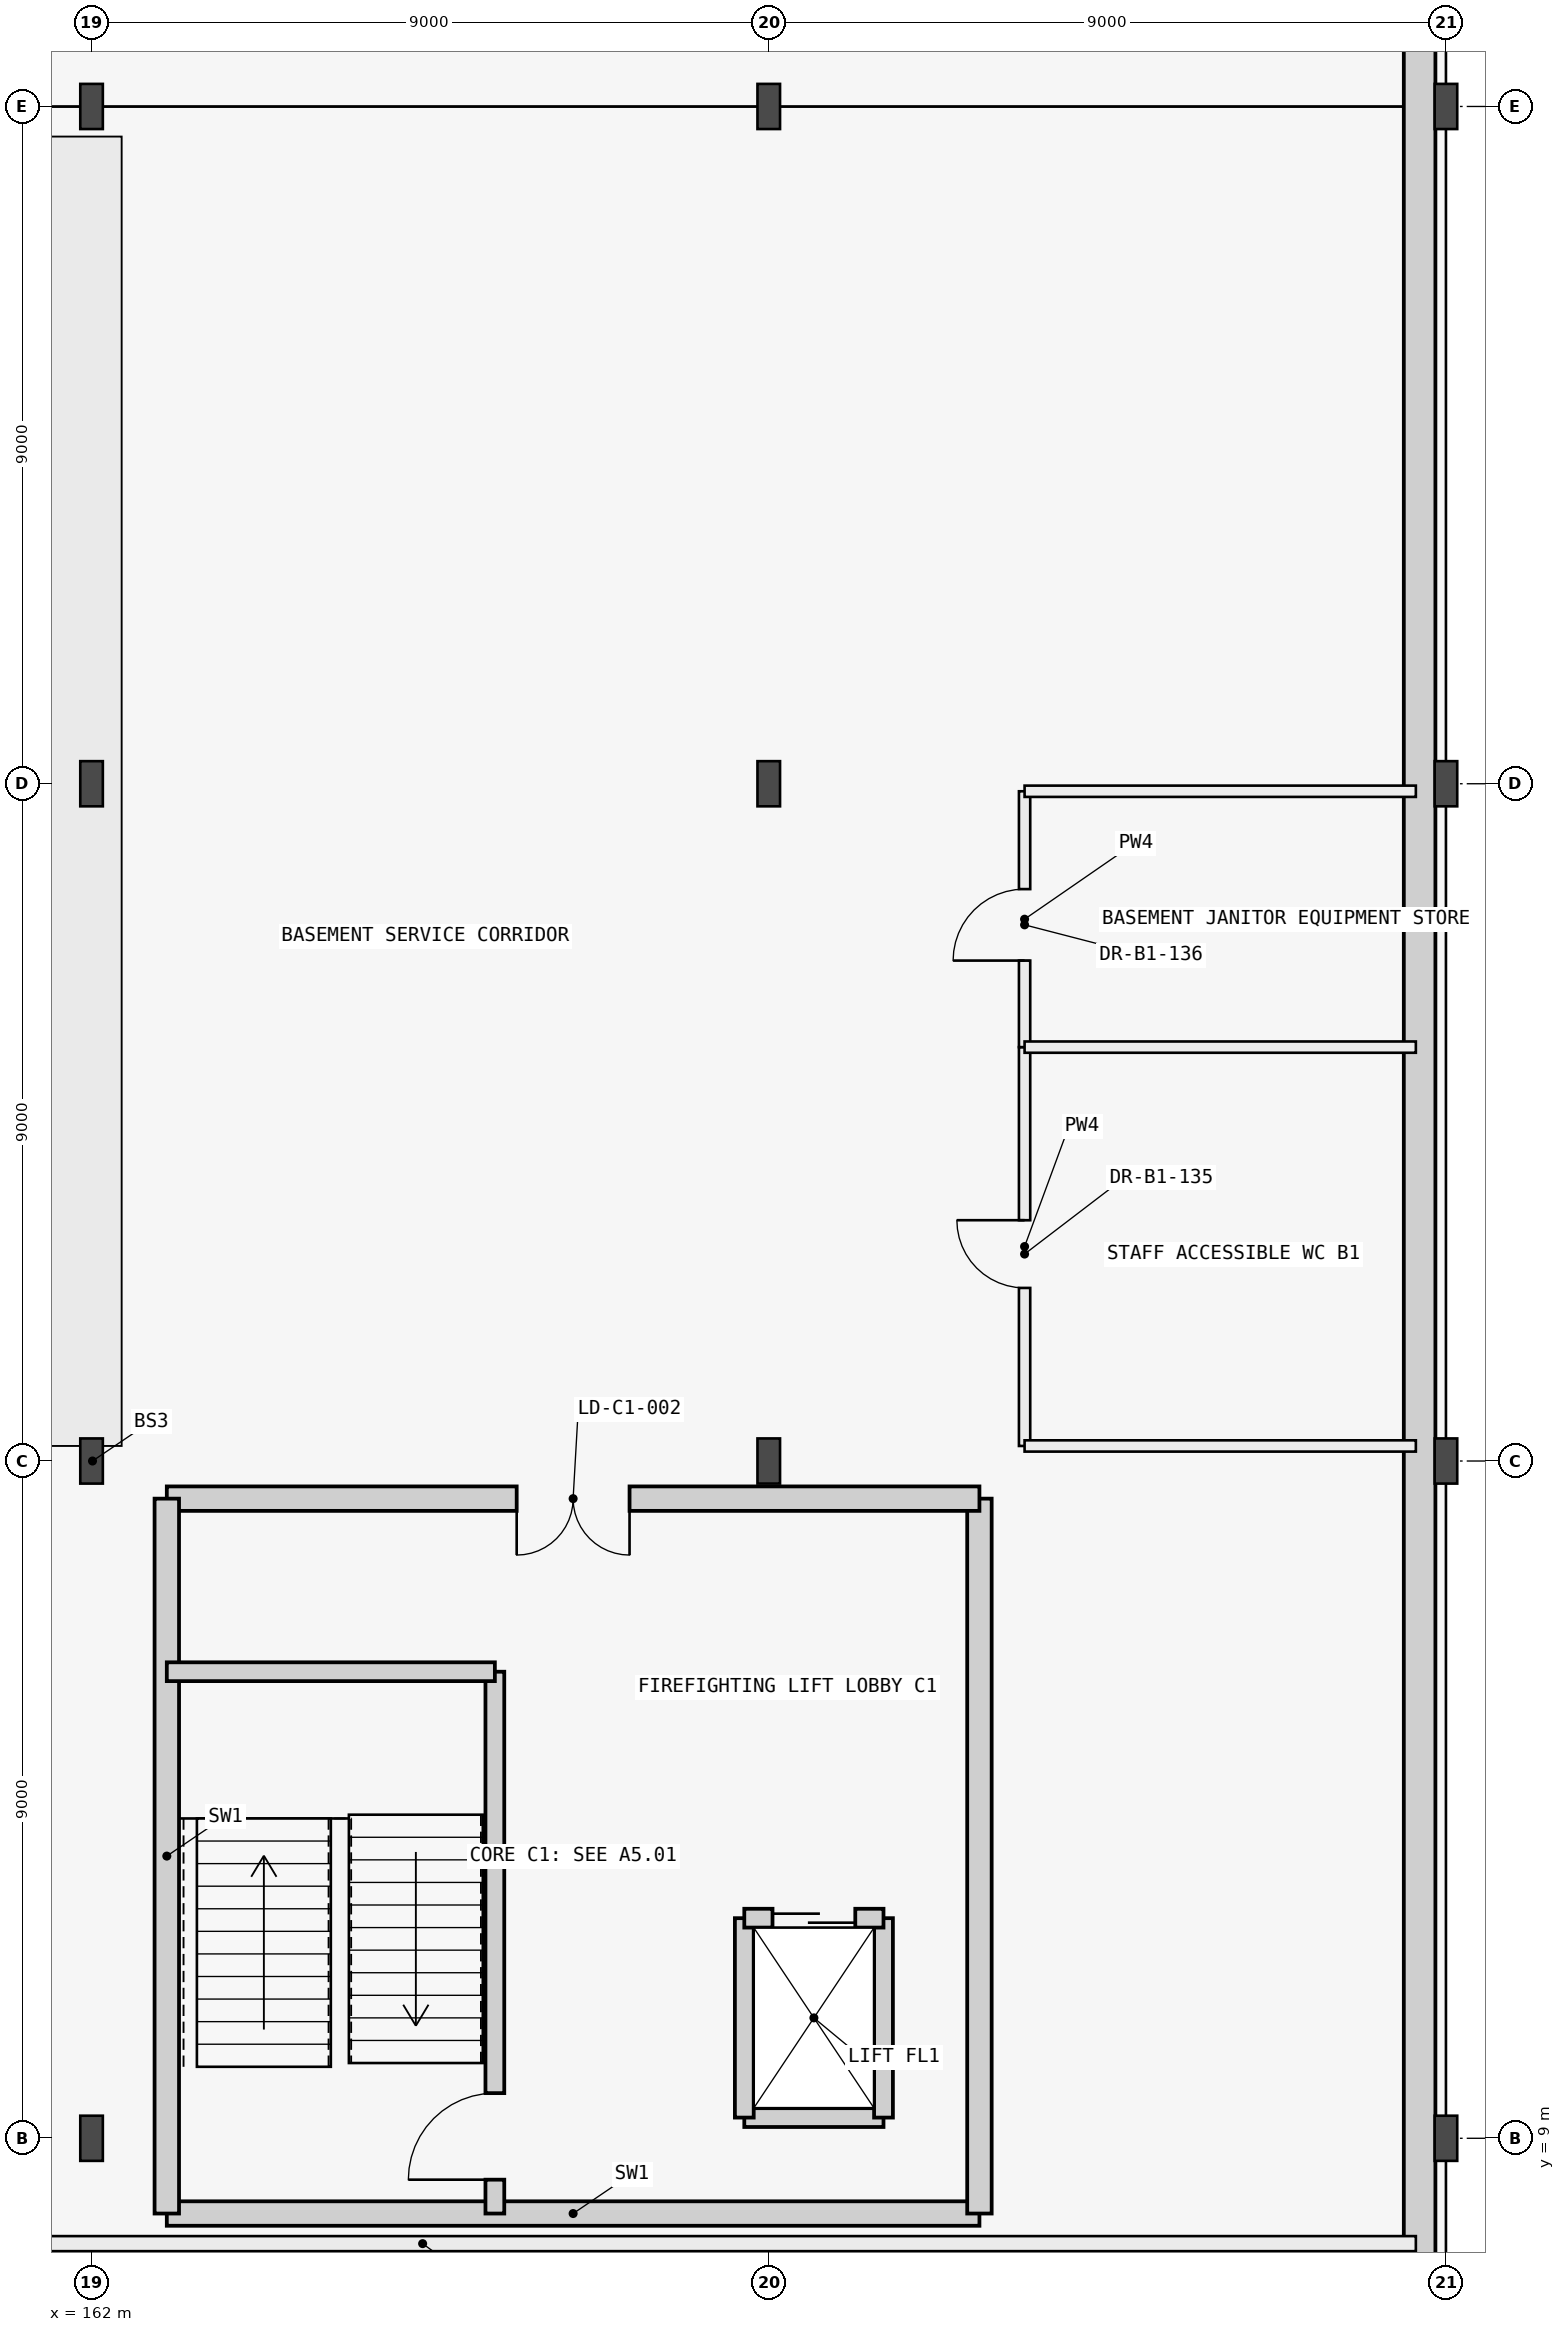
"""IFC4 building model, lengths in metres.
Left out: names, types, materials, properties, quantities, classifications, styles, units other than length and angle.
Written with IfcOpenShell. Run it as: python <this file> out.ifc"""

import sys

from ifc_helpers import new_model, si_unit, direction, frame, frame_2d, origin, origin_2d, place, context, subcontext, project, spatial, rectangle, i_section, extrude, element, fill, save


model = new_model("IFC4")
c1 = context("Model", 3, precision=1e-05, world=origin(), true_north=direction((0.0, 1.0)))
c2 = subcontext(c1, "Body", "Model", "MODEL_VIEW")
j1 = project(units=[si_unit("LENGTHUNIT", "METRE"), si_unit("PLANEANGLEUNIT", "RADIAN")], contexts=[c1])
p1 = place(None, origin())
s1 = spatial("IfcSite", under=j1, at=p1, CompositionType="ELEMENT")
p2 = place(p1, origin())
s2 = spatial("IfcBuilding", under=s1, at=p2, CompositionType="ELEMENT")
p3 = place(p2, frame((0.0, 0.0, -4.2)))
s3 = spatial("IfcBuildingStorey", under=s2, at=p3, CompositionType="ELEMENT", Elevation=-4.2)
for number, where, z_axis, x_axis in (
    (1, (162.0, 9.0, 0.0), (0.0, 0.0, 1.0), (1.0, 0.0, 0.0)),
    (2, (180.0, 9.0, 0.0), (0.0, 0.0, 1.0), (1.0, 0.0, 0.0)),
    (3, (162.0, 18.0, 0.0), (0.0, 0.0, 1.0), (1.0, 0.0, 0.0)),
    (4, (171.0, 18.0, 0.0), (0.0, 0.0, 1.0), (1.0, 0.0, 0.0)),
    (5, (180.0, 18.0, 0.0), (0.0, 0.0, 1.0), (1.0, 0.0, 0.0)),
    (6, (162.0, 27.0, 0.0), (0.0, 0.0, 1.0), (1.0, 0.0, 0.0)),
    (7, (171.0, 27.0, 0.0), (0.0, 0.0, 1.0), (1.0, 0.0, 0.0)),
    (8, (180.0, 27.0, 0.0), (0.0, 0.0, 1.0), (1.0, 0.0, 0.0)),
    (9, (162.0, 36.0, 0.0), (0.0, 0.0, 1.0), (1.0, 0.0, 0.0)),
    (10, (171.0, 36.0, 0.0), (0.0, 0.0, 1.0), (1.0, 0.0, 0.0)),
    (11, (180.0, 36.0, 0.0), (0.0, 0.0, 1.0), (1.0, 0.0, 0.0)),
):
    element("IfcColumn", number, at=place(p3, frame(where, z_axis=z_axis, x_axis=x_axis)), inside=s3, PredefinedType="COLUMN", context=c2, shape_type="SweptSolid", body=[
        extrude(i_section(OverallWidth=0.3, OverallDepth=0.6, WebThickness=0.015, FlangeThickness=0.03, FilletRadius=0.027, at=origin_2d()), origin(), (0.0, 0.0, 1.0), 4.2),
    ])
p4 = place(p3, frame((179.65, 0.56, 0.0), z_axis=(0.0, 0.0, 1.0), x_axis=(0.0, 1.0, 0.0)))
e12 = element("IfcWall", 12, at=p4, inside=s3, PredefinedType="USERDEFINED", context=c2, shape_type="SweptSolid", body=[
    extrude(rectangle(XDim=62.28, YDim=0.42, at=frame_2d((31.14, 0.0))), origin(), (0.0, 0.0, 1.0), 3.6),
])
p5 = place(p3, frame((163.0, 8.0, 0.0), z_axis=(0.0, 0.0, 1.0), x_axis=(1.0, 0.0, 0.0)))
e13 = element("IfcWall", 13, at=p5, inside=s3, PredefinedType="SHEAR", context=c2, shape_type="SweptSolid", body=[
    extrude(rectangle(XDim=10.8, YDim=0.325, at=frame_2d((5.4, 0.0))), origin(), (0.0, 0.0, 1.0), 3.94),
])
p6 = place(p3, frame((173.8, 8.0, 0.0), z_axis=(0.0, 0.0, 1.0), x_axis=(0.0, 1.0, 0.0)))
e14 = element("IfcWall", 14, at=p6, inside=s3, PredefinedType="SHEAR", context=c2, shape_type="SweptSolid", body=[
    extrude(rectangle(XDim=9.5, YDim=0.325, at=frame_2d((4.75, 0.0))), origin(), (0.0, 0.0, 1.0), 3.94),
])
p7 = place(p3, frame((173.8, 17.5, 0.0), z_axis=(0.0, 0.0, 1.0), x_axis=(-1.0, 0.0, 0.0)))
e15 = element("IfcWall", 15, at=p7, inside=s3, PredefinedType="SHEAR", context=c2, shape_type="SweptSolid", body=[
    extrude(rectangle(XDim=10.8, YDim=0.325, at=frame_2d((5.4, 0.0))), origin(), (0.0, 0.0, 1.0), 3.94),
])
p8 = place(p7, frame((4.65, 0.0, 0.0)))
e16 = element("IfcOpeningElement", 16, at=p8, cuts=e15, PredefinedType="OPENING", context=c2, shape_type="SweptSolid", body=[
    extrude(rectangle(XDim=1.5, YDim=2.2, at=frame_2d((0.75, 1.1))), frame((0.0, 0.172, 0.0), z_axis=(0.0, -1.0, 0.0), x_axis=(1.0, 0.0, 0.0)), (0.0, 0.0, 1.0), 0.345),
])
p9 = place(p3, frame((163.0, 17.5, 0.0), z_axis=(0.0, 0.0, 1.0), x_axis=(0.0, -1.0, 0.0)))
e17 = element("IfcWall", 17, at=p9, inside=s3, PredefinedType="SHEAR", context=c2, shape_type="SweptSolid", body=[
    extrude(rectangle(XDim=9.5, YDim=0.325, at=frame_2d((4.75, 0.0))), origin(), (0.0, 0.0, 1.0), 3.94),
])
p10 = place(p3, frame((167.36, 8.0, 0.0), z_axis=(0.0, 0.0, 1.0), x_axis=(0.0, 1.0, 0.0)))
e18 = element("IfcWall", 18, at=p10, inside=s3, PredefinedType="SHEAR", context=c2, shape_type="SweptSolid", body=[
    extrude(rectangle(XDim=7.2, YDim=0.25, at=frame_2d((3.6, 0.0))), origin(), (0.0, 0.0, 1.0), 3.94),
])
p11 = place(p10, frame((0.45, 0.0, 0.0)))
e19 = element("IfcOpeningElement", 19, at=p11, cuts=e18, PredefinedType="OPENING", context=c2, shape_type="SweptSolid", body=[
    extrude(rectangle(XDim=1.15, YDim=2.15, at=frame_2d((0.575, 1.075))), frame((0.0, 0.135, 0.0), z_axis=(0.0, -1.0, 0.0), x_axis=(1.0, 0.0, 0.0)), (0.0, 0.0, 1.0), 0.27),
])
p12 = place(p3, frame((163.0, 15.2, 0.0), z_axis=(0.0, 0.0, 1.0), x_axis=(1.0, 0.0, 0.0)))
e20 = element("IfcWall", 20, at=p12, inside=s3, PredefinedType="SHEAR", context=c2, shape_type="SweptSolid", body=[
    extrude(rectangle(XDim=4.36, YDim=0.25, at=frame_2d((2.18, 0.0))), origin(), (0.0, 0.0, 1.0), 3.94),
])
p13 = place(p3, frame((170.675, 9.275, 0.0), z_axis=(0.0, 0.0, 1.0), x_axis=(1.0, 0.0, 0.0)))
e21 = element("IfcWall", 21, at=p13, inside=s3, PredefinedType="SHEAR", context=c2, shape_type="SweptSolid", body=[
    extrude(rectangle(XDim=1.85, YDim=0.25, at=frame_2d((0.925, 0.0))), origin(), (0.0, 0.0, 1.0), 3.94),
])
for number, where, z_axis, x_axis in (
    (22, (170.675, 9.275, 0.0), (0.0, 0.0, 1.0), (0.0, 1.0, 0.0)),
    (23, (172.525, 9.275, 0.0), (0.0, 0.0, 1.0), (0.0, 1.0, 0.0)),
):
    element("IfcWall", number, at=place(p3, frame(where, z_axis=z_axis, x_axis=x_axis)), inside=s3, PredefinedType="SHEAR", context=c2, shape_type="SweptSolid", body=[
        extrude(rectangle(XDim=2.65, YDim=0.25, at=frame_2d((1.325, 0.0))), origin(), (0.0, 0.0, 1.0), 3.94),
    ])
p14 = place(p3, frame((170.675, 11.925, 0.0), z_axis=(0.0, 0.0, 1.0), x_axis=(1.0, 0.0, 0.0)))
e24 = element("IfcWall", 24, at=p14, inside=s3, PredefinedType="SHEAR", context=c2, shape_type="SweptSolid", body=[
    extrude(rectangle(XDim=1.85, YDim=0.25, at=frame_2d((0.925, 0.0))), origin(), (0.0, 0.0, 1.0), 3.94),
])
p15 = place(p14, frame((0.375, 0.0, 0.0)))
e25 = element("IfcOpeningElement", 25, at=p15, cuts=e24, PredefinedType="OPENING", context=c2, shape_type="SweptSolid", body=[
    extrude(rectangle(XDim=1.1, YDim=2.15, at=frame_2d((0.55, 1.075))), frame((0.0, 0.135, 0.0), z_axis=(0.0, -1.0, 0.0), x_axis=(1.0, 0.0, 0.0)), (0.0, 0.0, 1.0), 0.27),
])
p16 = place(p3, frame((153.2, 7.6, 0.0), z_axis=(0.0, 0.0, 1.0), x_axis=(1.0, 0.0, 0.0)))
e26 = element("IfcWall", 26, at=p16, inside=s3, PredefinedType="PARTITIONING", context=c2, shape_type="SweptSolid", body=[
    extrude(rectangle(XDim=26.4, YDim=0.2, at=frame_2d((13.2, 0.0))), origin(), (0.0, 0.0, 1.0), 3.94),
])
p17 = place(p16, frame((4.2, 0.0, 0.0)))
e27 = element("IfcOpeningElement", 27, at=p17, cuts=e26, PredefinedType="OPENING", context=c2, shape_type="SweptSolid", body=[
    extrude(rectangle(XDim=1.2, YDim=2.15, at=frame_2d((0.6, 1.075))), frame((0.0, 0.11, 0.0), z_axis=(0.0, -1.0, 0.0), x_axis=(1.0, 0.0, 0.0)), (0.0, 0.0, 1.0), 0.22),
])
p18 = place(p3, frame((174.4, 18.2, 0.0), z_axis=(0.0, 0.0, 1.0), x_axis=(0.0, 1.0, 0.0)))
e28 = element("IfcWall", 28, at=p18, inside=s3, PredefinedType="PARTITIONING", context=c2, shape_type="SweptSolid", body=[
    extrude(rectangle(XDim=5.3, YDim=0.15, at=frame_2d((2.65, 0.0))), origin(), (0.0, 0.0, 1.0), 3.615),
])
p19 = place(p18, frame((2.1, 0.0, 0.0)))
e29 = element("IfcOpeningElement", 29, at=p19, cuts=e28, PredefinedType="OPENING", context=c2, shape_type="SweptSolid", body=[
    extrude(rectangle(XDim=0.9, YDim=2.1, at=frame_2d((0.45, 1.05))), frame((0.0, 0.085, 0.0), z_axis=(0.0, -1.0, 0.0), x_axis=(1.0, 0.0, 0.0)), (0.0, 0.0, 1.0), 0.17),
])
p20 = place(p3, frame((174.4, 23.5, 0.0), z_axis=(0.0, 0.0, 1.0), x_axis=(0.0, 1.0, 0.0)))
e30 = element("IfcWall", 30, at=p20, inside=s3, PredefinedType="PARTITIONING", context=c2, shape_type="SweptSolid", body=[
    extrude(rectangle(XDim=3.4, YDim=0.15, at=frame_2d((1.7, 0.0))), origin(), (0.0, 0.0, 1.0), 3.615),
])
p21 = place(p20, frame((1.15, 0.0, 0.0)))
e31 = element("IfcOpeningElement", 31, at=p21, cuts=e30, PredefinedType="OPENING", context=c2, shape_type="SweptSolid", body=[
    extrude(rectangle(XDim=0.95, YDim=2.1, at=frame_2d((0.475, 1.05))), frame((0.0, 0.085, 0.0), z_axis=(0.0, -1.0, 0.0), x_axis=(1.0, 0.0, 0.0)), (0.0, 0.0, 1.0), 0.17),
])
p22 = place(p3, frame((174.4, 18.2, 0.0), z_axis=(0.0, 0.0, 1.0), x_axis=(1.0, 0.0, 0.0)))
e32 = element("IfcWall", 32, at=p22, inside=s3, PredefinedType="PARTITIONING", context=c2, shape_type="SweptSolid", body=[
    extrude(rectangle(XDim=5.2, YDim=0.15, at=frame_2d((2.6, 0.0))), origin(), (0.0, 0.0, 1.0), 3.415),
])
p23 = place(p3, frame((174.4, 23.5, 0.0), z_axis=(0.0, 0.0, 1.0), x_axis=(1.0, 0.0, 0.0)))
e33 = element("IfcWall", 33, at=p23, inside=s3, PredefinedType="PARTITIONING", context=c2, shape_type="SweptSolid", body=[
    extrude(rectangle(XDim=5.2, YDim=0.15, at=frame_2d((2.6, 0.0))), origin(), (0.0, 0.0, 1.0), 3.94),
])
p24 = place(p3, frame((174.4, 26.9, 0.0), z_axis=(0.0, 0.0, 1.0), x_axis=(1.0, 0.0, 0.0)))
e34 = element("IfcWall", 34, at=p24, inside=s3, PredefinedType="PARTITIONING", context=c2, shape_type="SweptSolid", body=[
    extrude(rectangle(XDim=5.2, YDim=0.15, at=frame_2d((2.6, 0.0))), origin(), (0.0, 0.0, 1.0), 3.415),
])
p25 = place(p11, origin())
e35 = element("IfcDoor", 35, at=p25, inside=s3, OperationType="SINGLE_SWING_LEFT", PredefinedType="DOOR", context=c2, shape_type="SweptSolid", body=[
    extrude(rectangle(XDim=1.15, YDim=2.15, at=frame_2d((0.575, 1.075))), frame((0.0, 0.025, 0.0), z_axis=(0.0, -1.0, 0.0), x_axis=(1.0, 0.0, 0.0)), (0.0, 0.0, 1.0), 0.05),
])
fill(e19, e35)
p26 = place(p8, origin())
e36 = element("IfcDoor", 36, at=p26, inside=s3, OperationType="DOUBLE_DOOR_SINGLE_SWING", PredefinedType="DOOR", context=c2, shape_type="SweptSolid", body=[
    extrude(rectangle(XDim=1.5, YDim=2.2, at=frame_2d((0.75, 1.1))), frame((0.0, 0.025, 0.0), z_axis=(0.0, -1.0, 0.0), x_axis=(1.0, 0.0, 0.0)), (0.0, 0.0, 1.0), 0.05),
])
fill(e16, e36)
p27 = place(p15, origin())
e37 = element("IfcDoor", 37, at=p27, inside=s3, OperationType="DOUBLE_DOOR_SLIDING", PredefinedType="USERDEFINED", context=c2, shape_type="SweptSolid", body=[
    extrude(rectangle(XDim=1.1, YDim=2.15, at=frame_2d((0.55, 1.075))), frame((0.0, 0.025, 0.0), z_axis=(0.0, -1.0, 0.0), x_axis=(1.0, 0.0, 0.0)), (0.0, 0.0, 1.0), 0.05),
])
fill(e25, e37)
p28 = place(p19, origin())
e38 = element("IfcDoor", 38, at=p28, inside=s3, OperationType="SINGLE_SWING_RIGHT", PredefinedType="DOOR", context=c2, shape_type="SweptSolid", body=[
    extrude(rectangle(XDim=0.9, YDim=2.1, at=frame_2d((0.45, 1.05))), frame((0.0, 0.025, 0.0), z_axis=(0.0, -1.0, 0.0), x_axis=(1.0, 0.0, 0.0)), (0.0, 0.0, 1.0), 0.05),
])
fill(e29, e38)
p29 = place(p21, origin())
e39 = element("IfcDoor", 39, at=p29, inside=s3, OperationType="SINGLE_SWING_LEFT", PredefinedType="DOOR", context=c2, shape_type="SweptSolid", body=[
    extrude(rectangle(XDim=0.95, YDim=2.1, at=frame_2d((0.475, 1.05))), frame((0.0, 0.025, 0.0), z_axis=(0.0, -1.0, 0.0), x_axis=(1.0, 0.0, 0.0)), (0.0, 0.0, 1.0), 0.05),
])
fill(e31, e39)
save(model, sys.argv[1])
